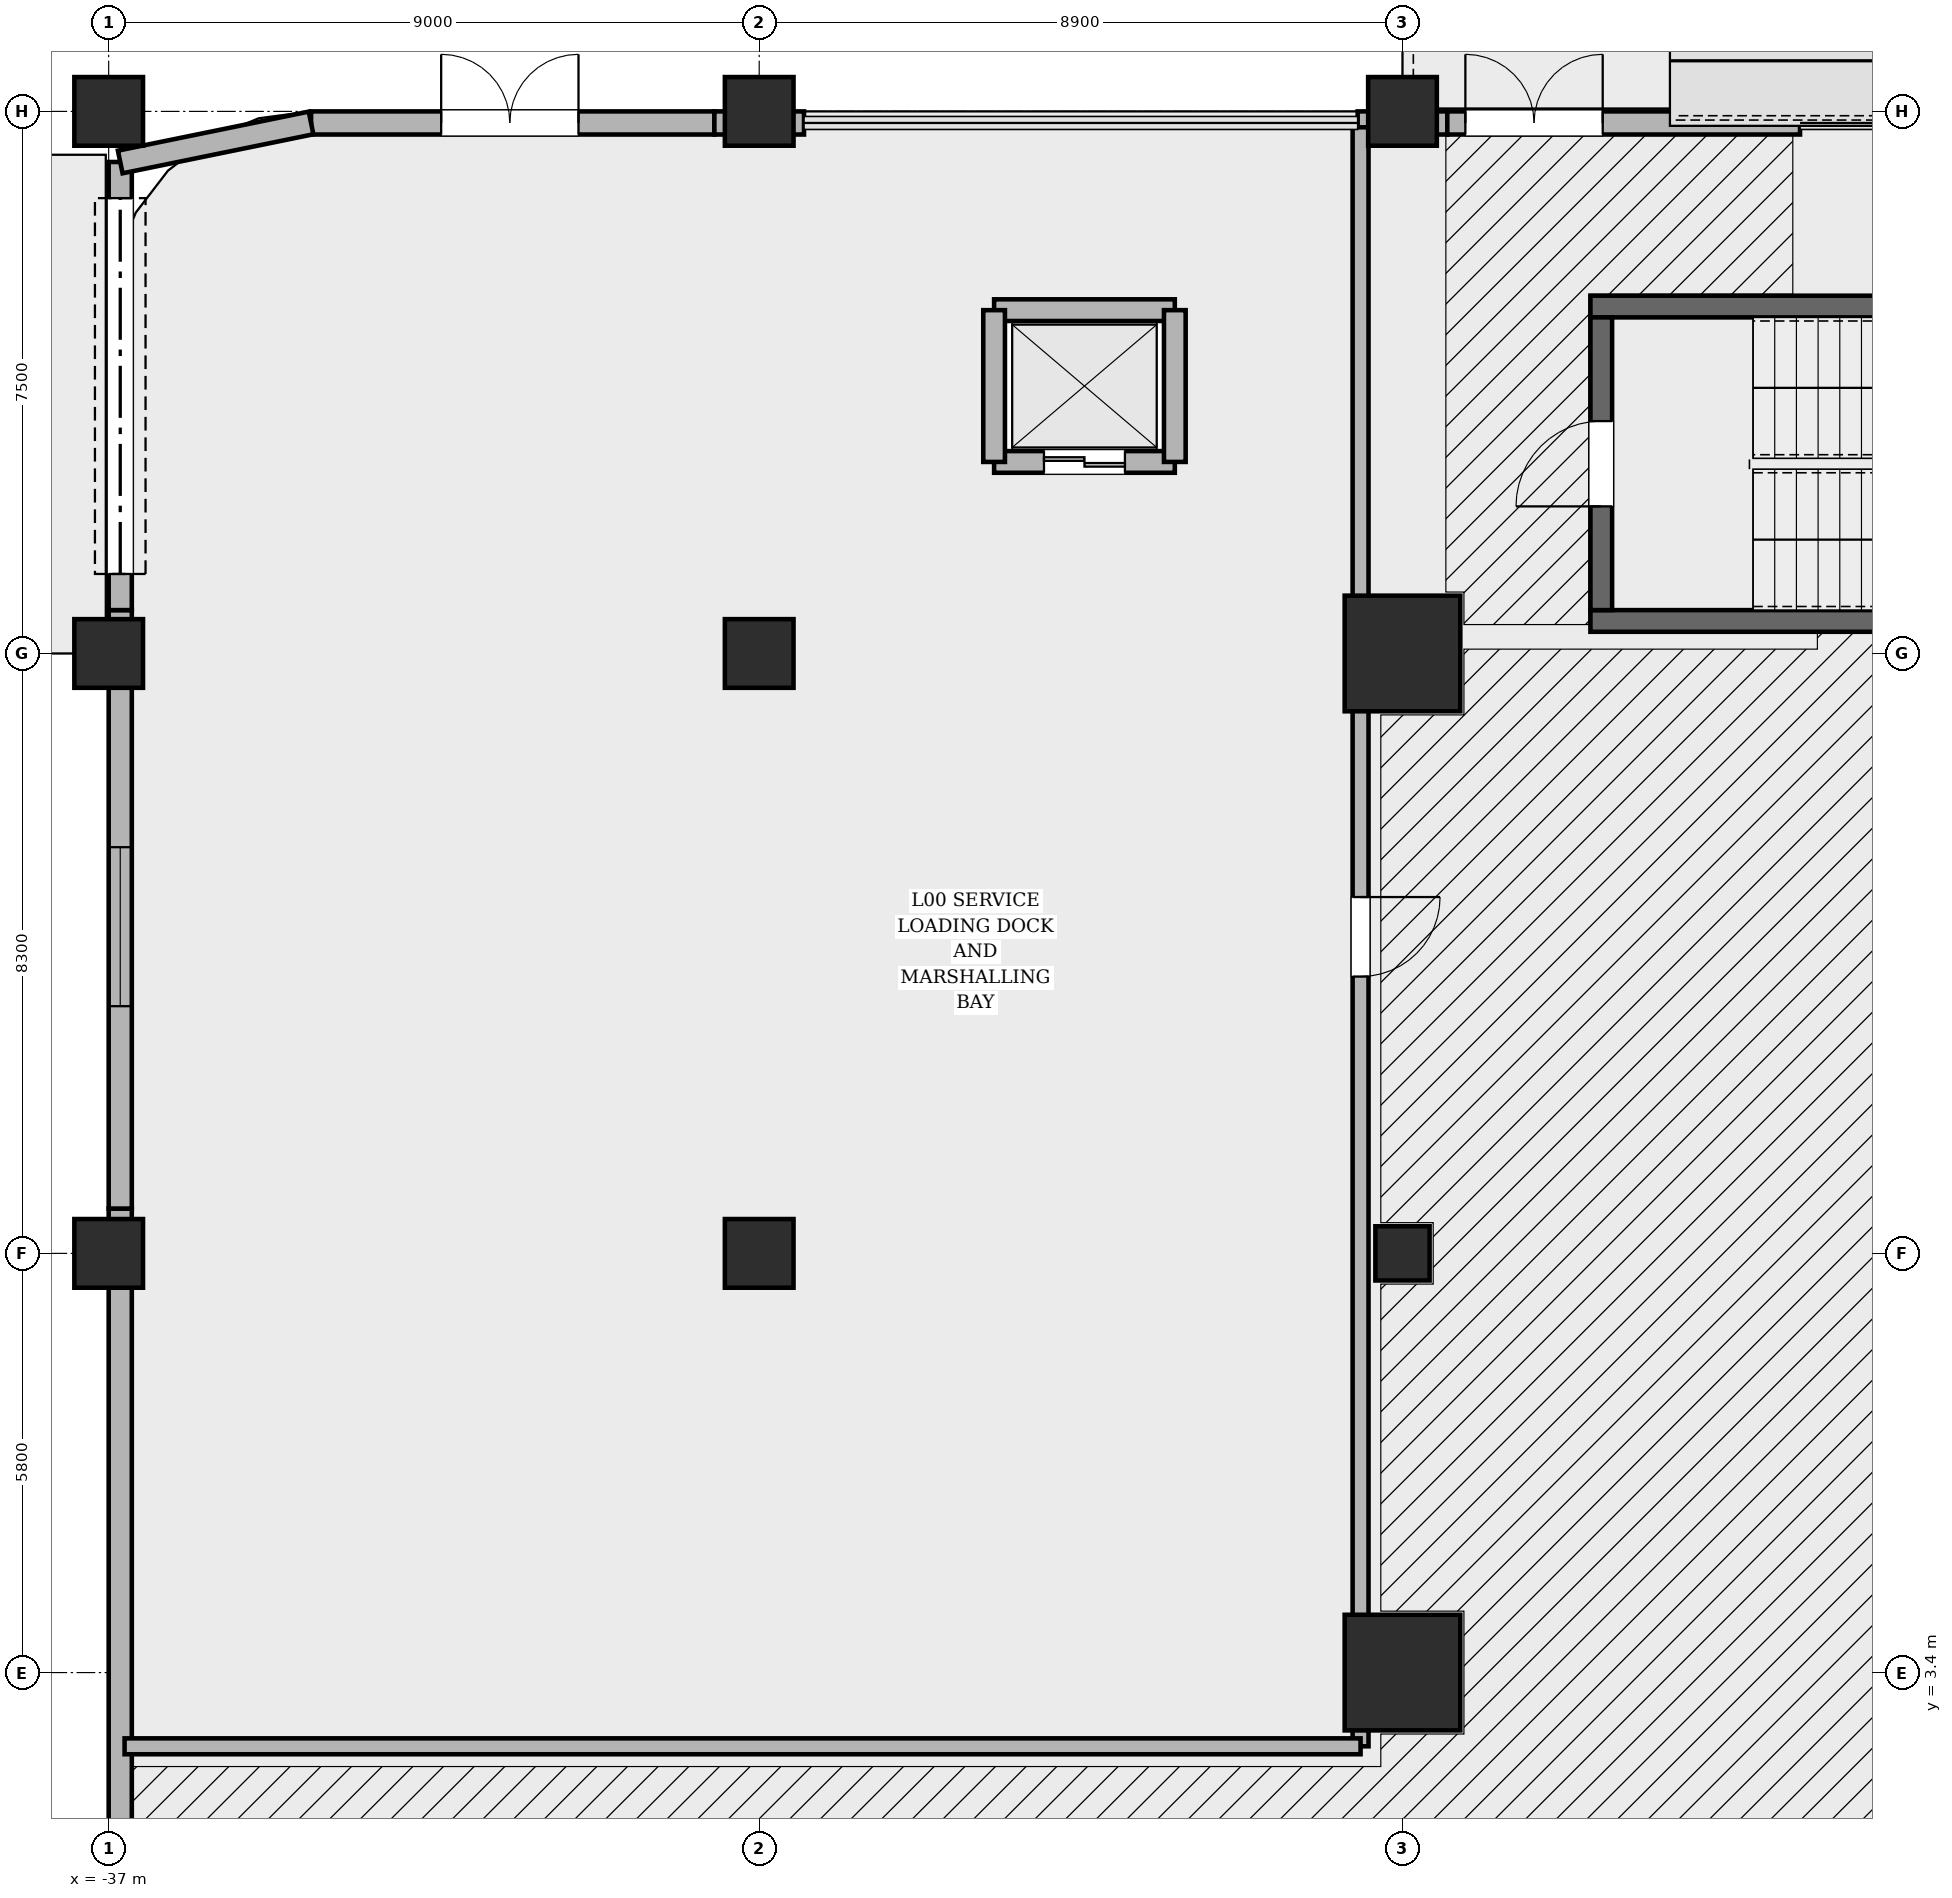
"""IFC4 building model, lengths in metres.
Left out: names, types, materials, properties, quantities, classifications, styles, units other than length and angle.
Written with IfcOpenShell. Run it as: python <this file> out.ifc"""

import sys

from ifc_helpers import new_model, si_unit, direction, frame, frame_2d, origin, origin_2d, place, context, subcontext, project, spatial, rectangle, hollow_rectangle, circle, extrude, element, fill, save


model = new_model("IFC4")
c1 = context("Model", 3, precision=1e-05, world=origin(), true_north=direction((0.0, 1.0)))
c2 = subcontext(c1, "Body", "Model", "MODEL_VIEW")
j1 = project(units=[si_unit("LENGTHUNIT", "METRE"), si_unit("PLANEANGLEUNIT", "RADIAN")], contexts=[c1])
p1 = place(None, origin())
s1 = spatial("IfcSite", under=j1, at=p1, CompositionType="ELEMENT")
p2 = place(p1, origin())
s2 = spatial("IfcBuilding", under=s1, at=p2, CompositionType="ELEMENT")
p3 = place(p2, origin())
s3 = spatial("IfcBuildingStorey", under=s2, at=p3, CompositionType="ELEMENT", Elevation=0.0)
for number, where, z_axis, x_axis in (
    (1, (-16.5, 17.95, 0.0), (0.0, 0.0, 1.0), (1.0, 0.0, 0.0)),
    (2, (-6.1, 22.3, 0.0), (0.0, 0.0, 1.0), (-1.0, 0.0, 0.0)),
):
    element("IfcWall", number, at=place(p3, frame(where, z_axis=z_axis, x_axis=x_axis)), inside=s3, PredefinedType="SOLIDWALL", context=c2, shape_type="SweptSolid", body=[
        extrude(rectangle(XDim=10.4, YDim=0.3, at=frame_2d((5.2, 0.0))), origin(), (0.0, 0.0, 1.0), 6.0),
    ])
p4 = place(p3, frame((-16.35, 18.1, 0.0), z_axis=(0.0, 0.0, 1.0), x_axis=(0.0, 1.0, 0.0)))
e3 = element("IfcWall", 3, at=p4, inside=s3, PredefinedType="SOLIDWALL", context=c2, shape_type="SweptSolid", body=[
    extrude(rectangle(XDim=4.05, YDim=0.3, at=frame_2d((2.025, 0.0))), origin(), (0.0, 0.0, 1.0), 6.0),
])
p5 = place(p4, frame((1.435, 0.0, 0.0)))
e4 = element("IfcOpeningElement", 4, at=p5, cuts=e3, PredefinedType="OPENING", context=c2, shape_type="SweptSolid", body=[
    extrude(rectangle(XDim=1.18, YDim=2.2, at=frame_2d((0.59, 1.1))), frame((0.0, 0.16, 0.0), z_axis=(0.0, -1.0, 0.0), x_axis=(1.0, 0.0, 0.0)), (0.0, 0.0, 1.0), 0.32),
])
for number, where, z_axis, x_axis in (
    (5, (-19.1, 17.5, 0.0), (0.0, 0.0, 1.0), (1.0, 0.0, 0.0)),
    (6, (-19.1, 3.4, 0.0), (0.0, 0.0, 1.0), (1.0, 0.0, 0.0)),
):
    element("IfcColumn", number, at=place(p3, frame(where, z_axis=z_axis, x_axis=x_axis)), inside=s3, PredefinedType="COLUMN", context=c2, shape_type="SweptSolid", body=[
        extrude(hollow_rectangle(XDim=1.6, YDim=1.6, WallThickness=0.05, at=origin_2d()), origin(), (0.0, 0.0, 1.0), 6.0),
    ])
for number, where, z_axis, x_axis in (
    (7, (-37.0, 9.2, 0.0), (0.0, 0.0, 1.0), (1.0, 0.0, 0.0)),
    (8, (-37.0, 17.5, 0.0), (0.0, 0.0, 1.0), (1.0, 0.0, 0.0)),
    (9, (-28.0, 17.5, 0.0), (0.0, 0.0, 1.0), (1.0, 0.0, 0.0)),
    (10, (-37.0, 25.0, 0.0), (0.0, 0.0, 1.0), (1.0, 0.0, 0.0)),
    (11, (-28.0, 25.0, 0.0), (0.0, 0.0, 1.0), (1.0, 0.0, 0.0)),
    (12, (-19.1, 25.0, 0.0), (0.0, 0.0, 1.0), (1.0, 0.0, 0.0)),
    (13, (-28.0, 9.2, 0.0), (0.0, 0.0, 1.0), (1.0, 0.0, 0.0)),
):
    element("IfcColumn", number, at=place(p3, frame(where, z_axis=z_axis, x_axis=x_axis)), inside=s3, PredefinedType="COLUMN", context=c2, shape_type="SweptSolid", body=[
        extrude(rectangle(XDim=0.95, YDim=0.95, at=origin_2d()), origin(), (0.0, 0.0, 1.0), 6.0),
    ])
p6 = place(p3, frame((-19.1, 9.2, 0.0), z_axis=(0.0, 0.0, 1.0), x_axis=(1.0, 0.0, 0.0)))
e14 = element("IfcColumn", 14, at=p6, inside=s3, PredefinedType="PILASTER", context=c2, shape_type="SweptSolid", body=[
    extrude(circle(Radius=0.375, at=origin_2d()), origin(), (0.0, 0.0, 1.0), 6.0),
])
p7 = place(p3, frame((-34.2, 24.84, 0.0), z_axis=(0.0, 0.0, 1.0), x_axis=(1.0, 0.0, 0.0)))
e15 = element("IfcWall", 15, at=p7, inside=s3, PredefinedType="SOLIDWALL", context=c2, shape_type="SweptSolid", body=[
    extrude(rectangle(XDim=5.58, YDim=0.32, at=frame_2d((2.79, 0.0))), origin(), (0.0, 0.0, 1.0), 5.164),
])
p8 = place(p7, frame((1.8, 0.0, 0.0)))
e16 = element("IfcOpeningElement", 16, at=p8, cuts=e15, PredefinedType="OPENING", context=c2, shape_type="SweptSolid", body=[
    extrude(rectangle(XDim=1.9, YDim=2.4, at=frame_2d((0.95, 1.2))), frame((0.0, 0.17, 0.0), z_axis=(0.0, -1.0, 0.0), x_axis=(1.0, 0.0, 0.0)), (0.0, 0.0, 1.0), 0.34),
])
p9 = place(p3, frame((-28.62, 24.84, 0.0), z_axis=(0.0, 0.0, 1.0), x_axis=(1.0, 0.0, 0.0)))
e17 = element("IfcWall", 17, at=p9, inside=s3, PredefinedType="SOLIDWALL", context=c2, shape_type="SweptSolid", body=[
    extrude(rectangle(XDim=1.24, YDim=0.32, at=frame_2d((0.62, 0.0))), origin(), (0.0, 0.0, 1.0), 5.014),
])
p10 = place(p3, frame((-19.72, 24.84, 0.0), z_axis=(0.0, 0.0, 1.0), x_axis=(1.0, 0.0, 0.0)))
e18 = element("IfcWall", 18, at=p10, inside=s3, PredefinedType="SOLIDWALL", context=c2, shape_type="SweptSolid", body=[
    extrude(rectangle(XDim=1.24, YDim=0.32, at=frame_2d((0.62, 0.0))), origin(), (0.0, 0.0, 1.0), 5.014),
])
p11 = place(p3, frame((-18.48, 24.84, 0.0), z_axis=(0.0, 0.0, 1.0), x_axis=(1.0, 0.0, 0.0)))
e19 = element("IfcWall", 19, at=p11, inside=s3, PredefinedType="SOLIDWALL", context=c2, shape_type="SweptSolid", body=[
    extrude(rectangle(XDim=4.88, YDim=0.32, at=frame_2d((2.44, 0.0))), origin(), (0.0, 0.0, 1.0), 5.164),
])
p12 = place(p11, frame((0.25, 0.0, 0.0)))
e20 = element("IfcOpeningElement", 20, at=p12, cuts=e19, PredefinedType="OPENING", context=c2, shape_type="SweptSolid", body=[
    extrude(rectangle(XDim=1.9, YDim=2.4, at=frame_2d((0.95, 1.2))), frame((0.0, 0.17, 0.0), z_axis=(0.0, -1.0, 0.0), x_axis=(1.0, 0.0, 0.0)), (0.0, 0.0, 1.0), 0.34),
])
p13 = place(p3, frame((-36.84, -9.82, 0.0), z_axis=(0.0, 0.0, 1.0), x_axis=(0.0, 1.0, 0.0)))
e21 = element("IfcWall", 21, at=p13, inside=s3, PredefinedType="SOLIDWALL", context=c2, shape_type="SweptSolid", body=[
    extrude(rectangle(XDim=19.64, YDim=0.32, at=frame_2d((9.82, 0.0))), origin(), (0.0, 0.0, 1.0), 5.014),
])
p14 = place(p3, frame((-36.84, 9.82, 0.0), z_axis=(0.0, 0.0, 1.0), x_axis=(0.0, 1.0, 0.0)))
e22 = element("IfcWall", 22, at=p14, inside=s3, PredefinedType="SOLIDWALL", context=c2, shape_type="SweptSolid", body=[
    extrude(rectangle(XDim=8.28, YDim=0.32, at=frame_2d((4.14, 0.0))), origin(), (0.0, 0.0, 1.0), 5.014),
])
p15 = place(p14, frame((2.8, 0.0, 2.2)))
e23 = element("IfcOpeningElement", 23, at=p15, cuts=e22, PredefinedType="OPENING", context=c2, shape_type="SweptSolid", body=[
    extrude(rectangle(XDim=2.2, YDim=1.2, at=frame_2d((1.1, 0.6))), frame((0.0, 0.17, 0.0), z_axis=(0.0, -1.0, 0.0), x_axis=(1.0, 0.0, 0.0)), (0.0, 0.0, 1.0), 0.34),
])
p16 = place(p3, frame((-36.84, 18.1, 0.0), z_axis=(0.0, 0.0, 1.0), x_axis=(0.0, 1.0, 0.0)))
e24 = element("IfcWall", 24, at=p16, inside=s3, PredefinedType="SOLIDWALL", context=c2, shape_type="SweptSolid", body=[
    extrude(rectangle(XDim=6.2, YDim=0.32, at=frame_2d((3.1, 0.0))), origin(), (0.0, 0.0, 1.0), 5.164),
])
p17 = place(p16, frame((0.5, 0.0, 0.0)))
e25 = element("IfcOpeningElement", 25, at=p17, cuts=e24, PredefinedType="OPENING", context=c2, shape_type="SweptSolid", body=[
    extrude(rectangle(XDim=5.2, YDim=3.2, at=frame_2d((2.6, 1.6))), frame((0.0, 0.17, 0.0), z_axis=(0.0, -1.0, 0.0), x_axis=(1.0, 0.0, 0.0)), (0.0, 0.0, 1.0), 0.34),
])
p18 = place(p3, frame((-36.84, 24.3, 0.0), z_axis=(0.0, 0.0, 1.0), x_axis=(0.979714123775, 0.20040018881, 0.0)))
e26 = element("IfcWall", 26, at=p18, inside=s3, PredefinedType="SOLIDWALL", context=c2, shape_type="SweptSolid", body=[
    extrude(rectangle(XDim=2.695, YDim=0.32, at=frame_2d((1.347, 0.0))), origin(), (0.0, 0.0, 1.0), 5.164),
])
p19 = place(p3, frame((-24.75, 20.15, 0.0), z_axis=(0.0, 0.0, 1.0), x_axis=(1.0, 0.0, 0.0)))
e27 = element("IfcWall", 27, at=p19, inside=s3, PredefinedType="SOLIDWALL", context=c2, shape_type="SweptSolid", body=[
    extrude(rectangle(XDim=2.5, YDim=0.3, at=frame_2d((1.25, 0.0))), origin(), (0.0, 0.0, 1.0), 5.72),
])
p20 = place(p19, frame((0.69, 0.0, 0.0)))
e28 = element("IfcOpeningElement", 28, at=p20, cuts=e27, PredefinedType="OPENING", context=c2, shape_type="SweptSolid", body=[
    extrude(rectangle(XDim=1.12, YDim=2.25, at=frame_2d((0.56, 1.125))), frame((0.0, 0.16, 0.0), z_axis=(0.0, -1.0, 0.0), x_axis=(1.0, 0.0, 0.0)), (0.0, 0.0, 1.0), 0.32),
])
p21 = place(p3, frame((-24.75, 22.25, 0.0), z_axis=(0.0, 0.0, 1.0), x_axis=(1.0, 0.0, 0.0)))
e29 = element("IfcWall", 29, at=p21, inside=s3, PredefinedType="SOLIDWALL", context=c2, shape_type="SweptSolid", body=[
    extrude(rectangle(XDim=2.5, YDim=0.3, at=frame_2d((1.25, 0.0))), origin(), (0.0, 0.0, 1.0), 5.72),
])
for number, where, z_axis, x_axis in (
    (30, (-24.75, 20.15, 0.0), (0.0, 0.0, 1.0), (0.0, 1.0, 0.0)),
    (31, (-22.25, 20.15, 0.0), (0.0, 0.0, 1.0), (0.0, 1.0, 0.0)),
):
    element("IfcWall", number, at=place(p3, frame(where, z_axis=z_axis, x_axis=x_axis)), inside=s3, PredefinedType="SOLIDWALL", context=c2, shape_type="SweptSolid", body=[
        extrude(rectangle(XDim=2.1, YDim=0.3, at=frame_2d((1.05, 0.0))), origin(), (0.0, 0.0, 1.0), 5.72),
    ])
p22 = place(p3, frame((-19.68, 24.78, 0.0), z_axis=(0.0, 0.0, 1.0), x_axis=(0.0, -1.0, 0.0)))
e32 = element("IfcWall", 32, at=p22, inside=s3, PredefinedType="SOLIDWALL", context=c2, shape_type="SweptSolid", body=[
    extrude(rectangle(XDim=22.4, YDim=0.22, at=frame_2d((11.2, 0.0))), origin(), (0.0, 0.0, 1.0), 5.014),
])
p23 = place(p22, frame((10.65, 0.0, 0.0)))
e33 = element("IfcOpeningElement", 33, at=p23, cuts=e32, PredefinedType="OPENING", context=c2, shape_type="SweptSolid", body=[
    extrude(rectangle(XDim=1.1, YDim=2.2, at=frame_2d((0.55, 1.1))), frame((0.0, 0.12, 0.0), z_axis=(0.0, -1.0, 0.0), x_axis=(1.0, 0.0, 0.0)), (0.0, 0.0, 1.0), 0.24),
])
p24 = place(p3, frame((-19.68, 2.38, 0.0), z_axis=(0.0, 0.0, 1.0), x_axis=(-1.0, 0.0, 0.0)))
e34 = element("IfcWall", 34, at=p24, inside=s3, PredefinedType="SOLIDWALL", context=c2, shape_type="SweptSolid", body=[
    extrude(rectangle(XDim=17.1, YDim=0.22, at=frame_2d((8.55, 0.0))), origin(), (0.0, 0.0, 1.0), 5.014),
])
p25 = place(p8, origin())
e35 = element("IfcDoor", 35, at=p25, inside=s3, OperationType="DOUBLE_DOOR_SINGLE_SWING", PredefinedType="DOOR", context=c2, shape_type="SweptSolid", body=[
    extrude(rectangle(XDim=1.9, YDim=2.4, at=frame_2d((0.95, 1.2))), frame((0.0, 0.025, 0.0), z_axis=(0.0, -1.0, 0.0), x_axis=(1.0, 0.0, 0.0)), (0.0, 0.0, 1.0), 0.05),
])
fill(e16, e35)
p26 = place(p12, origin())
e36 = element("IfcDoor", 36, at=p26, inside=s3, OperationType="DOUBLE_DOOR_SINGLE_SWING", PredefinedType="DOOR", context=c2, shape_type="SweptSolid", body=[
    extrude(rectangle(XDim=1.9, YDim=2.4, at=frame_2d((0.95, 1.2))), frame((0.0, 0.025, 0.0), z_axis=(0.0, -1.0, 0.0), x_axis=(1.0, 0.0, 0.0)), (0.0, 0.0, 1.0), 0.05),
])
fill(e20, e36)
p27 = place(p15, origin())
e37 = element("IfcWindow", 37, at=p27, inside=s3, PartitioningType="SINGLE_PANEL", PredefinedType="WINDOW", context=c2, shape_type="SweptSolid", body=[
    extrude(rectangle(XDim=2.2, YDim=1.2, at=frame_2d((1.1, 0.6))), frame((0.0, 0.03, 0.0), z_axis=(0.0, -1.0, 0.0), x_axis=(1.0, 0.0, 0.0)), (0.0, 0.0, 1.0), 0.06),
])
fill(e23, e37)
p28 = place(p17, origin())
e38 = element("IfcDoor", 38, at=p28, inside=s3, OperationType="ROLLINGUP", PredefinedType="GATE", context=c2, shape_type="SweptSolid", body=[
    extrude(rectangle(XDim=5.2, YDim=3.2, at=frame_2d((2.6, 1.6))), frame((0.0, 0.025, 0.0), z_axis=(0.0, -1.0, 0.0), x_axis=(1.0, 0.0, 0.0)), (0.0, 0.0, 1.0), 0.05),
])
fill(e25, e38)
p29 = place(p5, origin())
e39 = element("IfcDoor", 39, at=p29, inside=s3, OperationType="SINGLE_SWING_LEFT", PredefinedType="DOOR", context=c2, shape_type="SweptSolid", body=[
    extrude(rectangle(XDim=1.18, YDim=2.2, at=frame_2d((0.59, 1.1))), frame((0.0, 0.025, 0.0), z_axis=(0.0, -1.0, 0.0), x_axis=(1.0, 0.0, 0.0)), (0.0, 0.0, 1.0), 0.05),
])
fill(e4, e39)
p30 = place(p20, origin())
e40 = element("IfcDoor", 40, at=p30, inside=s3, OperationType="DOUBLE_DOOR_SLIDING", PredefinedType="DOOR", context=c2, shape_type="SweptSolid", body=[
    extrude(rectangle(XDim=1.12, YDim=2.25, at=frame_2d((0.56, 1.125))), frame((0.0, 0.025, 0.0), z_axis=(0.0, -1.0, 0.0), x_axis=(1.0, 0.0, 0.0)), (0.0, 0.0, 1.0), 0.05),
])
fill(e28, e40)
p31 = place(p23, origin())
e41 = element("IfcDoor", 41, at=p31, inside=s3, OperationType="SINGLE_SWING_LEFT", PredefinedType="DOOR", context=c2, shape_type="SweptSolid", body=[
    extrude(rectangle(XDim=1.1, YDim=2.2, at=frame_2d((0.55, 1.1))), frame((0.0, 0.025, 0.0), z_axis=(0.0, -1.0, 0.0), x_axis=(1.0, 0.0, 0.0)), (0.0, 0.0, 1.0), 0.05),
])
fill(e33, e41)
save(model, sys.argv[1])
